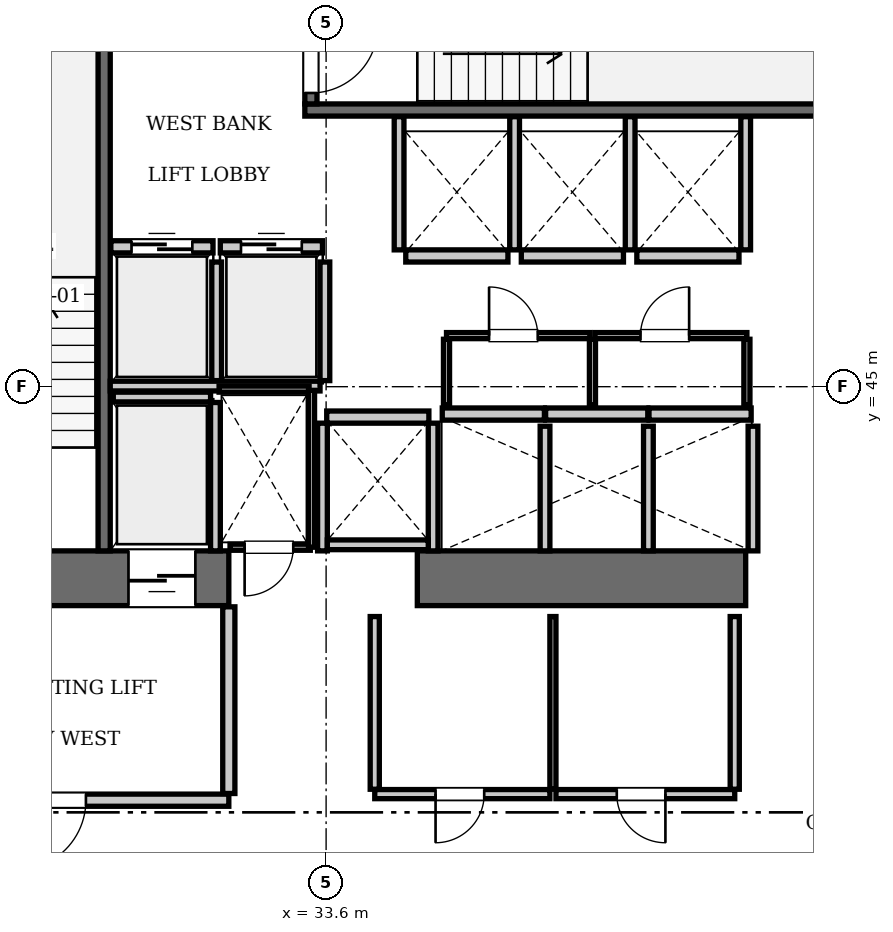
"""IFC4 building model, lengths in metres.
Left out: names, types, materials, properties, quantities, classifications, styles, units other than length and angle.
Written with IfcOpenShell. Run it as: python <this file> out.ifc"""

import sys

from ifc_helpers import new_model, si_unit, direction, frame, frame_2d, origin, place, context, subcontext, project, spatial, rectangle, extrude, element, fill, save


model = new_model("IFC4")
c1 = context("Model", 3, precision=1e-05, world=origin(), true_north=direction((0.0, 1.0)))
c2 = subcontext(c1, "Body", "Model", "MODEL_VIEW")
j1 = project(units=[si_unit("LENGTHUNIT", "METRE"), si_unit("PLANEANGLEUNIT", "RADIAN")], contexts=[c1])
p1 = place(None, origin())
s1 = spatial("IfcSite", under=j1, at=p1, CompositionType="ELEMENT")
p2 = place(p1, origin())
s2 = spatial("IfcBuilding", under=s1, at=p2, CompositionType="ELEMENT")
p3 = place(p2, frame((0.0, 0.0, 84.7)))
s3 = spatial("IfcBuildingStorey", under=s2, at=p3, CompositionType="ELEMENT", Elevation=84.7)
p4 = place(p3, frame((25.2, 41.85, 0.0), z_axis=(0.0, 0.0, 1.0), x_axis=(1.0, 0.0, 0.0)))
e1 = element("IfcWall", 1, at=p4, inside=s3, PredefinedType="SHEAR", context=c2, shape_type="SweptSolid", body=[
    extrude(rectangle(XDim=6.8, YDim=0.9, at=frame_2d((3.4, 0.0))), origin(), (0.0, 0.0, 1.0), 3.85),
])
p5 = place(p4, frame((1.65, 0.0, 0.0)))
e2 = element("IfcOpeningElement", 2, at=p5, cuts=e1, PredefinedType="OPENING", context=c2, shape_type="SweptSolid", body=[
    extrude(rectangle(XDim=1.15, YDim=2.15, at=frame_2d((0.575, 1.075))), frame((0.0, 0.46, 0.0), z_axis=(0.0, -1.0, 0.0), x_axis=(1.0, 0.0, 0.0)), (0.0, 0.0, 1.0), 0.92),
])
p6 = place(p4, frame((5.15, 0.0, 0.0)))
e3 = element("IfcOpeningElement", 3, at=p6, cuts=e1, PredefinedType="OPENING", context=c2, shape_type="SweptSolid", body=[
    extrude(rectangle(XDim=1.1, YDim=2.2, at=frame_2d((0.55, 1.1))), frame((0.0, 0.46, 0.0), z_axis=(0.0, -1.0, 0.0), x_axis=(1.0, 0.0, 0.0)), (0.0, 0.0, 1.0), 0.92),
])
p7 = place(p3, frame((35.1, 41.85, 0.0), z_axis=(0.0, 0.0, 1.0), x_axis=(1.0, 0.0, 0.0)))
e4 = element("IfcWall", 4, at=p7, inside=s3, PredefinedType="SHEAR", context=c2, shape_type="SweptSolid", body=[
    extrude(rectangle(XDim=5.4, YDim=0.9, at=frame_2d((2.7, 0.0))), origin(), (0.0, 0.0, 1.0), 3.85),
])
p8 = place(p3, frame((29.95, 42.3, 0.0), z_axis=(0.0, 0.0, 1.0), x_axis=(0.0, 1.0, 0.0)))
e5 = element("IfcWall", 5, at=p8, inside=s3, PredefinedType="SOLIDWALL", context=c2, shape_type="SweptSolid", body=[
    extrude(rectangle(XDim=8.85, YDim=0.2, at=frame_2d((4.425, 0.0))), origin(), (0.0, 0.0, 1.0), 3.61),
])
p9 = place(p3, frame((33.25, 49.55, 0.0), z_axis=(0.0, 0.0, 1.0), x_axis=(1.0, 0.0, 0.0)))
e6 = element("IfcWall", 6, at=p9, inside=s3, PredefinedType="SOLIDWALL", context=c2, shape_type="SweptSolid", body=[
    extrude(rectangle(XDim=9.1, YDim=0.2, at=frame_2d((4.55, 0.0))), origin(), (0.0, 0.0, 1.0), 3.61),
])
p10 = place(p3, frame((33.35, 49.65, 0.0), z_axis=(0.0, 0.0, 1.0), x_axis=(0.0, 1.0, 0.0)))
e7 = element("IfcWall", 7, at=p10, inside=s3, PredefinedType="SOLIDWALL", context=c2, shape_type="SweptSolid", body=[
    extrude(rectangle(XDim=3.45, YDim=0.2, at=frame_2d((1.725, 0.0))), origin(), (0.0, 0.0, 1.0), 3.61),
])
p11 = place(p10, frame((0.18, 0.0, 0.0)))
e8 = element("IfcOpeningElement", 8, at=p11, cuts=e7, PredefinedType="OPENING", context=c2, shape_type="SweptSolid", body=[
    extrude(rectangle(XDim=1.1, YDim=2.15, at=frame_2d((0.55, 1.075))), frame((0.0, 0.11, 0.0), z_axis=(0.0, -1.0, 0.0), x_axis=(1.0, 0.0, 0.0)), (0.0, 0.0, 1.0), 0.22),
])
p12 = place(p3, frame((30.06, 47.3, 0.0), z_axis=(0.0, 0.0, 1.0), x_axis=(1.0, 0.0, 0.0)))
e9 = element("IfcWall", 9, at=p12, inside=s3, PredefinedType="SOLIDWALL", context=c2, shape_type="SweptSolid", body=[
    extrude(rectangle(XDim=1.68, YDim=0.2, at=frame_2d((0.84, 0.0))), origin(), (0.0, 0.0, 1.0), 3.61),
])
p13 = place(p12, frame((0.34, 0.0, 0.0)))
e10 = element("IfcOpeningElement", 10, at=p13, cuts=e9, PredefinedType="OPENING", context=c2, shape_type="SweptSolid", body=[
    extrude(rectangle(XDim=1.0, YDim=2.15, at=frame_2d((0.5, 1.075))), frame((0.0, 0.11, 0.0), z_axis=(0.0, -1.0, 0.0), x_axis=(1.0, 0.0, 0.0)), (0.0, 0.0, 1.0), 0.22),
])
p14 = place(p3, frame((31.86, 47.3, 0.0), z_axis=(0.0, 0.0, 1.0), x_axis=(1.0, 0.0, 0.0)))
e11 = element("IfcWall", 11, at=p14, inside=s3, PredefinedType="SOLIDWALL", context=c2, shape_type="SweptSolid", body=[
    extrude(rectangle(XDim=1.68, YDim=0.2, at=frame_2d((0.84, 0.0))), origin(), (0.0, 0.0, 1.0), 3.61),
])
p15 = place(p14, frame((0.34, 0.0, 0.0)))
e12 = element("IfcOpeningElement", 12, at=p15, cuts=e11, PredefinedType="OPENING", context=c2, shape_type="SweptSolid", body=[
    extrude(rectangle(XDim=1.0, YDim=2.15, at=frame_2d((0.5, 1.075))), frame((0.0, 0.11, 0.0), z_axis=(0.0, -1.0, 0.0), x_axis=(1.0, 0.0, 0.0)), (0.0, 0.0, 1.0), 0.22),
])
for number, where, z_axis, x_axis in (
    (13, (35.51, 44.55, 0.0), (0.0, 0.0, 1.0), (1.0, 0.0, 0.0)),
    (14, (37.21, 44.55, 0.0), (0.0, 0.0, 1.0), (1.0, 0.0, 0.0)),
):
    element("IfcWall", number, at=place(p3, frame(where, z_axis=z_axis, x_axis=x_axis)), inside=s3, PredefinedType="SOLIDWALL", context=c2, shape_type="SweptSolid", body=[
        extrude(rectangle(XDim=1.68, YDim=0.2, at=frame_2d((0.84, 0.0))), origin(), (0.0, 0.0, 1.0), 3.61),
    ])
for number, where, z_axis, x_axis in (
    (15, (38.91, 44.55, 0.0), (0.0, 0.0, 1.0), (1.0, 0.0, 0.0)),
    (16, (34.91, 47.15, 0.0), (0.0, 0.0, 1.0), (1.0, 0.0, 0.0)),
):
    element("IfcWall", number, at=place(p3, frame(where, z_axis=z_axis, x_axis=x_axis)), inside=s3, PredefinedType="SOLIDWALL", context=c2, shape_type="SweptSolid", body=[
        extrude(rectangle(XDim=1.68, YDim=0.2, at=frame_2d((0.84, 0.0))), origin(), (0.0, 0.0, 1.0), 3.61),
    ])
for number, where, z_axis, x_axis in (
    (17, (36.81, 47.15, 0.0), (0.0, 0.0, 1.0), (1.0, 0.0, 0.0)),
    (18, (38.71, 47.15, 0.0), (0.0, 0.0, 1.0), (1.0, 0.0, 0.0)),
    (19, (33.61, 44.5, 0.0), (0.0, 0.0, 1.0), (1.0, 0.0, 0.0)),
):
    element("IfcWall", number, at=place(p3, frame(where, z_axis=z_axis, x_axis=x_axis)), inside=s3, PredefinedType="SOLIDWALL", context=c2, shape_type="SweptSolid", body=[
        extrude(rectangle(XDim=1.68, YDim=0.2, at=frame_2d((0.84, 0.0))), origin(), (0.0, 0.0, 1.0), 3.61),
    ])
p16 = place(p3, frame((30.1, 44.83, 0.0), z_axis=(0.0, 0.0, 1.0), x_axis=(1.0, 0.0, 0.0)))
e20 = element("IfcWall", 20, at=p16, inside=s3, PredefinedType="SOLIDWALL", context=c2, shape_type="SweptSolid", body=[
    extrude(rectangle(XDim=1.6, YDim=0.16, at=frame_2d((0.8, 0.0))), origin(), (0.0, 0.0, 1.0), 3.61),
])
p17 = place(p3, frame((31.78, 42.3, 0.0), z_axis=(0.0, 0.0, 1.0), x_axis=(0.0, 1.0, 0.0)))
e21 = element("IfcWall", 21, at=p17, inside=s3, PredefinedType="SOLIDWALL", context=c2, shape_type="SweptSolid", body=[
    extrude(rectangle(XDim=2.44, YDim=0.16, at=frame_2d((1.22, 0.0))), origin(), (0.0, 0.0, 1.0), 3.61),
])
for number, where, z_axis, x_axis in (
    (22, (31.8, 45.1, 0.0), (0.0, 0.0, 1.0), (0.0, 1.0, 0.0)),
    (23, (33.58, 45.1, 0.0), (0.0, 0.0, 1.0), (0.0, 1.0, 0.0)),
):
    element("IfcWall", number, at=place(p3, frame(where, z_axis=z_axis, x_axis=x_axis)), inside=s3, PredefinedType="SOLIDWALL", context=c2, shape_type="SweptSolid", body=[
        extrude(rectangle(XDim=1.95, YDim=0.16, at=frame_2d((0.975, 0.0))), origin(), (0.0, 0.0, 1.0), 3.61),
    ])
p18 = place(p3, frame((30.05, 45.01, 0.0), z_axis=(0.0, 0.0, 1.0), x_axis=(1.0, 0.0, 0.0)))
e24 = element("IfcWall", 24, at=p18, inside=s3, PredefinedType="SOLIDWALL", context=c2, shape_type="SweptSolid", body=[
    extrude(rectangle(XDim=3.45, YDim=0.16, at=frame_2d((1.725, 0.0))), origin(), (0.0, 0.0, 1.0), 3.61),
])
for number, where, z_axis, x_axis in (
    (25, (37.2, 42.3, 0.0), (0.0, 0.0, 1.0), (0.0, 1.0, 0.0)),
    (26, (38.9, 42.3, 0.0), (0.0, 0.0, 1.0), (0.0, 1.0, 0.0)),
    (27, (40.62, 42.3, 0.0), (0.0, 0.0, 1.0), (0.0, 1.0, 0.0)),
):
    element("IfcWall", number, at=place(p3, frame(where, z_axis=z_axis, x_axis=x_axis)), inside=s3, PredefinedType="SOLIDWALL", context=c2, shape_type="SweptSolid", body=[
        extrude(rectangle(XDim=2.05, YDim=0.16, at=frame_2d((1.025, 0.0))), origin(), (0.0, 0.0, 1.0), 3.61),
    ])
for number, where, z_axis, x_axis in (
    (28, (34.8, 47.25, 0.0), (0.0, 0.0, 1.0), (0.0, 1.0, 0.0)),
    (29, (36.7, 47.25, 0.0), (0.0, 0.0, 1.0), (0.0, 1.0, 0.0)),
    (30, (38.6, 47.25, 0.0), (0.0, 0.0, 1.0), (0.0, 1.0, 0.0)),
    (31, (40.5, 47.25, 0.0), (0.0, 0.0, 1.0), (0.0, 1.0, 0.0)),
):
    element("IfcWall", number, at=place(p3, frame(where, z_axis=z_axis, x_axis=x_axis)), inside=s3, PredefinedType="SOLIDWALL", context=c2, shape_type="SweptSolid", body=[
        extrude(rectangle(XDim=2.19, YDim=0.16, at=frame_2d((1.095, 0.0))), origin(), (0.0, 0.0, 1.0), 3.61),
    ])
for number, where, z_axis, x_axis in (
    (32, (33.54, 42.3, 0.0), (0.0, 0.0, 1.0), (0.0, 1.0, 0.0)),
    (33, (35.36, 42.3, 0.0), (0.0, 0.0, 1.0), (0.0, 1.0, 0.0)),
):
    element("IfcWall", number, at=place(p3, frame(where, z_axis=z_axis, x_axis=x_axis)), inside=s3, PredefinedType="SOLIDWALL", context=c2, shape_type="SweptSolid", body=[
        extrude(rectangle(XDim=2.1, YDim=0.16, at=frame_2d((1.05, 0.0))), origin(), (0.0, 0.0, 1.0), 3.61),
    ])
p19 = place(p3, frame((33.62, 42.4, 0.0), z_axis=(0.0, 0.0, 1.0), x_axis=(1.0, 0.0, 0.0)))
e34 = element("IfcWall", 34, at=p19, inside=s3, PredefinedType="SOLIDWALL", context=c2, shape_type="SweptSolid", body=[
    extrude(rectangle(XDim=1.66, YDim=0.16, at=frame_2d((0.83, 0.0))), origin(), (0.0, 0.0, 1.0), 3.61),
])
p20 = place(p3, frame((26.2, 38.2, 0.0), z_axis=(0.0, 0.0, 1.0), x_axis=(1.0, 0.0, 0.0)))
e35 = element("IfcWall", 35, at=p20, inside=s3, PredefinedType="PARTITIONING", context=c2, shape_type="SweptSolid", body=[
    extrude(rectangle(XDim=5.8, YDim=0.2, at=frame_2d((2.9, 0.0))), origin(), (0.0, 0.0, 1.0), 3.61),
])
p21 = place(p20, frame((2.3, 0.0, 0.0)))
e36 = element("IfcOpeningElement", 36, at=p21, cuts=e35, PredefinedType="OPENING", context=c2, shape_type="SweptSolid", body=[
    extrude(rectangle(XDim=1.15, YDim=2.15, at=frame_2d((0.575, 1.075))), frame((0.0, 0.11, 0.0), z_axis=(0.0, -1.0, 0.0), x_axis=(1.0, 0.0, 0.0)), (0.0, 0.0, 1.0), 0.22),
])
p22 = place(p3, frame((32.0, 38.31, 0.0), z_axis=(0.0, 0.0, 1.0), x_axis=(0.0, 1.0, 0.0)))
e37 = element("IfcWall", 37, at=p22, inside=s3, PredefinedType="PARTITIONING", context=c2, shape_type="SweptSolid", body=[
    extrude(rectangle(XDim=3.07, YDim=0.2, at=frame_2d((1.535, 0.0))), origin(), (0.0, 0.0, 1.0), 3.61),
])
p23 = place(p3, frame((32.02, 42.36, 0.0), z_axis=(0.0, 0.0, 1.0), x_axis=(1.0, 0.0, 0.0)))
e38 = element("IfcWall", 38, at=p23, inside=s3, PredefinedType="PARTITIONING", context=c2, shape_type="SweptSolid", body=[
    extrude(rectangle(XDim=1.32, YDim=0.1, at=frame_2d((0.66, 0.0))), origin(), (0.0, 0.0, 1.0), 3.61),
])
p24 = place(p23, frame((0.24, 0.0, 0.0)))
e39 = element("IfcOpeningElement", 39, at=p24, cuts=e38, PredefinedType="OPENING", context=c2, shape_type="SweptSolid", body=[
    extrude(rectangle(XDim=0.8, YDim=2.05, at=frame_2d((0.4, 1.025))), frame((0.0, 0.06, 0.0), z_axis=(0.0, -1.0, 0.0), x_axis=(1.0, 0.0, 0.0)), (0.0, 0.0, 1.0), 0.12),
])
p25 = place(p3, frame((31.84, 44.96, 0.0), z_axis=(0.0, 0.0, 1.0), x_axis=(1.0, 0.0, 0.0)))
e40 = element("IfcWall", 40, at=p25, inside=s3, PredefinedType="PARTITIONING", context=c2, shape_type="SweptSolid", body=[
    extrude(rectangle(XDim=1.48, YDim=0.1, at=frame_2d((0.74, 0.0))), origin(), (0.0, 0.0, 1.0), 3.61),
])
p26 = place(p3, frame((33.36, 42.36, 0.0), z_axis=(0.0, 0.0, 1.0), x_axis=(0.0, 1.0, 0.0)))
e41 = element("IfcWall", 41, at=p26, inside=s3, PredefinedType="PARTITIONING", context=c2, shape_type="SweptSolid", body=[
    extrude(rectangle(XDim=2.58, YDim=0.1, at=frame_2d((1.29, 0.0))), origin(), (0.0, 0.0, 1.0), 3.61),
])
p27 = place(p3, frame((35.58, 45.84, 0.0), z_axis=(0.0, 0.0, 1.0), x_axis=(1.0, 0.0, 0.0)))
e42 = element("IfcWall", 42, at=p27, inside=s3, PredefinedType="PARTITIONING", context=c2, shape_type="SweptSolid", body=[
    extrude(rectangle(XDim=2.36, YDim=0.1, at=frame_2d((1.18, 0.0))), origin(), (0.0, 0.0, 1.0), 3.61),
])
p28 = place(p27, frame((0.7, 0.0, 0.0)))
e43 = element("IfcOpeningElement", 43, at=p28, cuts=e42, PredefinedType="OPENING", context=c2, shape_type="SweptSolid", body=[
    extrude(rectangle(XDim=0.8, YDim=2.05, at=frame_2d((0.4, 1.025))), frame((0.0, 0.06, 0.0), z_axis=(0.0, -1.0, 0.0), x_axis=(1.0, 0.0, 0.0)), (0.0, 0.0, 1.0), 0.12),
])
p29 = place(p3, frame((38.02, 45.84, 0.0), z_axis=(0.0, 0.0, 1.0), x_axis=(1.0, 0.0, 0.0)))
e44 = element("IfcWall", 44, at=p29, inside=s3, PredefinedType="PARTITIONING", context=c2, shape_type="SweptSolid", body=[
    extrude(rectangle(XDim=2.5, YDim=0.1, at=frame_2d((1.25, 0.0))), origin(), (0.0, 0.0, 1.0), 3.61),
])
p30 = place(p29, frame((0.75, 0.0, 0.0)))
e45 = element("IfcOpeningElement", 45, at=p30, cuts=e44, PredefinedType="OPENING", context=c2, shape_type="SweptSolid", body=[
    extrude(rectangle(XDim=0.8, YDim=2.05, at=frame_2d((0.4, 1.025))), frame((0.0, 0.06, 0.0), z_axis=(0.0, -1.0, 0.0), x_axis=(1.0, 0.0, 0.0)), (0.0, 0.0, 1.0), 0.12),
])
for number, where, z_axis, x_axis in (
    (46, (35.58, 44.7, 0.0), (0.0, 0.0, 1.0), (0.0, 1.0, 0.0)),
    (47, (37.98, 44.7, 0.0), (0.0, 0.0, 1.0), (0.0, 1.0, 0.0)),
    (48, (40.52, 44.7, 0.0), (0.0, 0.0, 1.0), (0.0, 1.0, 0.0)),
):
    element("IfcWall", number, at=place(p3, frame(where, z_axis=z_axis, x_axis=x_axis)), inside=s3, PredefinedType="PARTITIONING", context=c2, shape_type="SweptSolid", body=[
        extrude(rectangle(XDim=1.08, YDim=0.1, at=frame_2d((0.54, 0.0))), origin(), (0.0, 0.0, 1.0), 3.61),
    ])
p31 = place(p3, frame((34.4, 38.3, 0.0), z_axis=(0.0, 0.0, 1.0), x_axis=(1.0, 0.0, 0.0)))
e49 = element("IfcWall", 49, at=p31, inside=s3, PredefinedType="PARTITIONING", context=c2, shape_type="SweptSolid", body=[
    extrude(rectangle(XDim=2.88, YDim=0.15, at=frame_2d((1.44, 0.0))), origin(), (0.0, 0.0, 1.0), 3.61),
])
p32 = place(p31, frame((1.0, 0.0, 0.0)))
e50 = element("IfcOpeningElement", 50, at=p32, cuts=e49, PredefinedType="OPENING", context=c2, shape_type="SweptSolid", body=[
    extrude(rectangle(XDim=0.8, YDim=2.05, at=frame_2d((0.4, 1.025))), frame((0.0, 0.085, 0.0), z_axis=(0.0, -1.0, 0.0), x_axis=(1.0, 0.0, 0.0)), (0.0, 0.0, 1.0), 0.17),
])
p33 = place(p3, frame((37.38, 38.3, 0.0), z_axis=(0.0, 0.0, 1.0), x_axis=(1.0, 0.0, 0.0)))
e51 = element("IfcWall", 51, at=p33, inside=s3, PredefinedType="PARTITIONING", context=c2, shape_type="SweptSolid", body=[
    extrude(rectangle(XDim=2.94, YDim=0.15, at=frame_2d((1.47, 0.0))), origin(), (0.0, 0.0, 1.0), 3.61),
])
p34 = place(p33, frame((1.0, 0.0, 0.0)))
e52 = element("IfcOpeningElement", 52, at=p34, cuts=e51, PredefinedType="OPENING", context=c2, shape_type="SweptSolid", body=[
    extrude(rectangle(XDim=0.8, YDim=2.05, at=frame_2d((0.4, 1.025))), frame((0.0, 0.085, 0.0), z_axis=(0.0, -1.0, 0.0), x_axis=(1.0, 0.0, 0.0)), (0.0, 0.0, 1.0), 0.17),
])
p35 = place(p3, frame((34.4, 38.38, 0.0), z_axis=(0.0, 0.0, 1.0), x_axis=(0.0, 1.0, 0.0)))
e53 = element("IfcWall", 53, at=p35, inside=s3, PredefinedType="PARTITIONING", context=c2, shape_type="SweptSolid", body=[
    extrude(rectangle(XDim=2.84, YDim=0.15, at=frame_2d((1.42, 0.0))), origin(), (0.0, 0.0, 1.0), 3.61),
])
p36 = place(p3, frame((37.33, 38.38, 0.0), z_axis=(0.0, 0.0, 1.0), x_axis=(0.0, 1.0, 0.0)))
e54 = element("IfcWall", 54, at=p36, inside=s3, PredefinedType="PARTITIONING", context=c2, shape_type="SweptSolid", body=[
    extrude(rectangle(XDim=2.84, YDim=0.1, at=frame_2d((1.42, 0.0))), origin(), (0.0, 0.0, 1.0), 3.61),
])
p37 = place(p3, frame((40.32, 38.38, 0.0), z_axis=(0.0, 0.0, 1.0), x_axis=(0.0, 1.0, 0.0)))
e55 = element("IfcWall", 55, at=p37, inside=s3, PredefinedType="PARTITIONING", context=c2, shape_type="SweptSolid", body=[
    extrude(rectangle(XDim=2.84, YDim=0.15, at=frame_2d((1.42, 0.0))), origin(), (0.0, 0.0, 1.0), 3.61),
])
p38 = place(p11, frame((1.1, 0.0, 0.0), z_axis=(0.0, 0.0, 1.0), x_axis=(-1.0, 0.0, 0.0)))
e56 = element("IfcDoor", 56, at=p38, inside=s3, OperationType="SINGLE_SWING_LEFT", PredefinedType="DOOR", context=c2, shape_type="SweptSolid", body=[
    extrude(rectangle(XDim=1.1, YDim=2.15, at=frame_2d((0.55, 1.075))), frame((0.0, 0.025, 0.0), z_axis=(0.0, -1.0, 0.0), x_axis=(1.0, 0.0, 0.0)), (0.0, 0.0, 1.0), 0.05),
])
fill(e8, e56)
p39 = place(p13, origin())
e57 = element("IfcDoor", 57, at=p39, inside=s3, OperationType="SLIDING_TO_LEFT", PredefinedType="DOOR", context=c2, shape_type="SweptSolid", body=[
    extrude(rectangle(XDim=1.0, YDim=2.15, at=frame_2d((0.5, 1.075))), frame((0.0, 0.025, 0.0), z_axis=(0.0, -1.0, 0.0), x_axis=(1.0, 0.0, 0.0)), (0.0, 0.0, 1.0), 0.05),
])
fill(e10, e57)
p40 = place(p15, origin())
e58 = element("IfcDoor", 58, at=p40, inside=s3, OperationType="SLIDING_TO_LEFT", PredefinedType="DOOR", context=c2, shape_type="SweptSolid", body=[
    extrude(rectangle(XDim=1.0, YDim=2.15, at=frame_2d((0.5, 1.075))), frame((0.0, 0.025, 0.0), z_axis=(0.0, -1.0, 0.0), x_axis=(1.0, 0.0, 0.0)), (0.0, 0.0, 1.0), 0.05),
])
fill(e12, e58)
p41 = place(p6, frame((1.1, 0.0, 0.0), z_axis=(0.0, 0.0, 1.0), x_axis=(-1.0, 0.0, 0.0)))
e59 = element("IfcDoor", 59, at=p41, inside=s3, OperationType="SLIDING_TO_LEFT", PredefinedType="DOOR", context=c2, shape_type="SweptSolid", body=[
    extrude(rectangle(XDim=1.1, YDim=2.2, at=frame_2d((0.55, 1.1))), frame((0.0, 0.025, 0.0), z_axis=(0.0, -1.0, 0.0), x_axis=(1.0, 0.0, 0.0)), (0.0, 0.0, 1.0), 0.05),
])
fill(e3, e59)
p42 = place(p21, frame((1.15, 0.0, 0.0), z_axis=(0.0, 0.0, 1.0), x_axis=(-1.0, 0.0, 0.0)))
e60 = element("IfcDoor", 60, at=p42, inside=s3, OperationType="SINGLE_SWING_RIGHT", PredefinedType="DOOR", context=c2, shape_type="SweptSolid", body=[
    extrude(rectangle(XDim=1.15, YDim=2.15, at=frame_2d((0.575, 1.075))), frame((0.0, 0.025, 0.0), z_axis=(0.0, -1.0, 0.0), x_axis=(1.0, 0.0, 0.0)), (0.0, 0.0, 1.0), 0.05),
])
fill(e36, e60)
p43 = place(p24, frame((0.8, 0.0, 0.0), z_axis=(0.0, 0.0, 1.0), x_axis=(-1.0, 0.0, 0.0)))
e61 = element("IfcDoor", 61, at=p43, inside=s3, OperationType="SINGLE_SWING_RIGHT", PredefinedType="DOOR", context=c2, shape_type="SweptSolid", body=[
    extrude(rectangle(XDim=0.8, YDim=2.05, at=frame_2d((0.4, 1.025))), frame((0.0, 0.025, 0.0), z_axis=(0.0, -1.0, 0.0), x_axis=(1.0, 0.0, 0.0)), (0.0, 0.0, 1.0), 0.05),
])
fill(e39, e61)
p44 = place(p28, origin())
e62 = element("IfcDoor", 62, at=p44, inside=s3, OperationType="SINGLE_SWING_LEFT", PredefinedType="DOOR", context=c2, shape_type="SweptSolid", body=[
    extrude(rectangle(XDim=0.8, YDim=2.05, at=frame_2d((0.4, 1.025))), frame((0.0, 0.025, 0.0), z_axis=(0.0, -1.0, 0.0), x_axis=(1.0, 0.0, 0.0)), (0.0, 0.0, 1.0), 0.05),
])
fill(e43, e62)
p45 = place(p30, origin())
e63 = element("IfcDoor", 63, at=p45, inside=s3, OperationType="SINGLE_SWING_RIGHT", PredefinedType="DOOR", context=c2, shape_type="SweptSolid", body=[
    extrude(rectangle(XDim=0.8, YDim=2.05, at=frame_2d((0.4, 1.025))), frame((0.0, 0.025, 0.0), z_axis=(0.0, -1.0, 0.0), x_axis=(1.0, 0.0, 0.0)), (0.0, 0.0, 1.0), 0.05),
])
fill(e45, e63)
p46 = place(p32, frame((0.8, 0.0, 0.0), z_axis=(0.0, 0.0, 1.0), x_axis=(-1.0, 0.0, 0.0)))
e64 = element("IfcDoor", 64, at=p46, inside=s3, OperationType="SINGLE_SWING_RIGHT", PredefinedType="DOOR", context=c2, shape_type="SweptSolid", body=[
    extrude(rectangle(XDim=0.8, YDim=2.05, at=frame_2d((0.4, 1.025))), frame((0.0, 0.025, 0.0), z_axis=(0.0, -1.0, 0.0), x_axis=(1.0, 0.0, 0.0)), (0.0, 0.0, 1.0), 0.05),
])
fill(e50, e64)
p47 = place(p34, frame((0.8, 0.0, 0.0), z_axis=(0.0, 0.0, 1.0), x_axis=(-1.0, 0.0, 0.0)))
e65 = element("IfcDoor", 65, at=p47, inside=s3, OperationType="SINGLE_SWING_LEFT", PredefinedType="DOOR", context=c2, shape_type="SweptSolid", body=[
    extrude(rectangle(XDim=0.8, YDim=2.05, at=frame_2d((0.4, 1.025))), frame((0.0, 0.025, 0.0), z_axis=(0.0, -1.0, 0.0), x_axis=(1.0, 0.0, 0.0)), (0.0, 0.0, 1.0), 0.05),
])
fill(e52, e65)
save(model, sys.argv[1])
